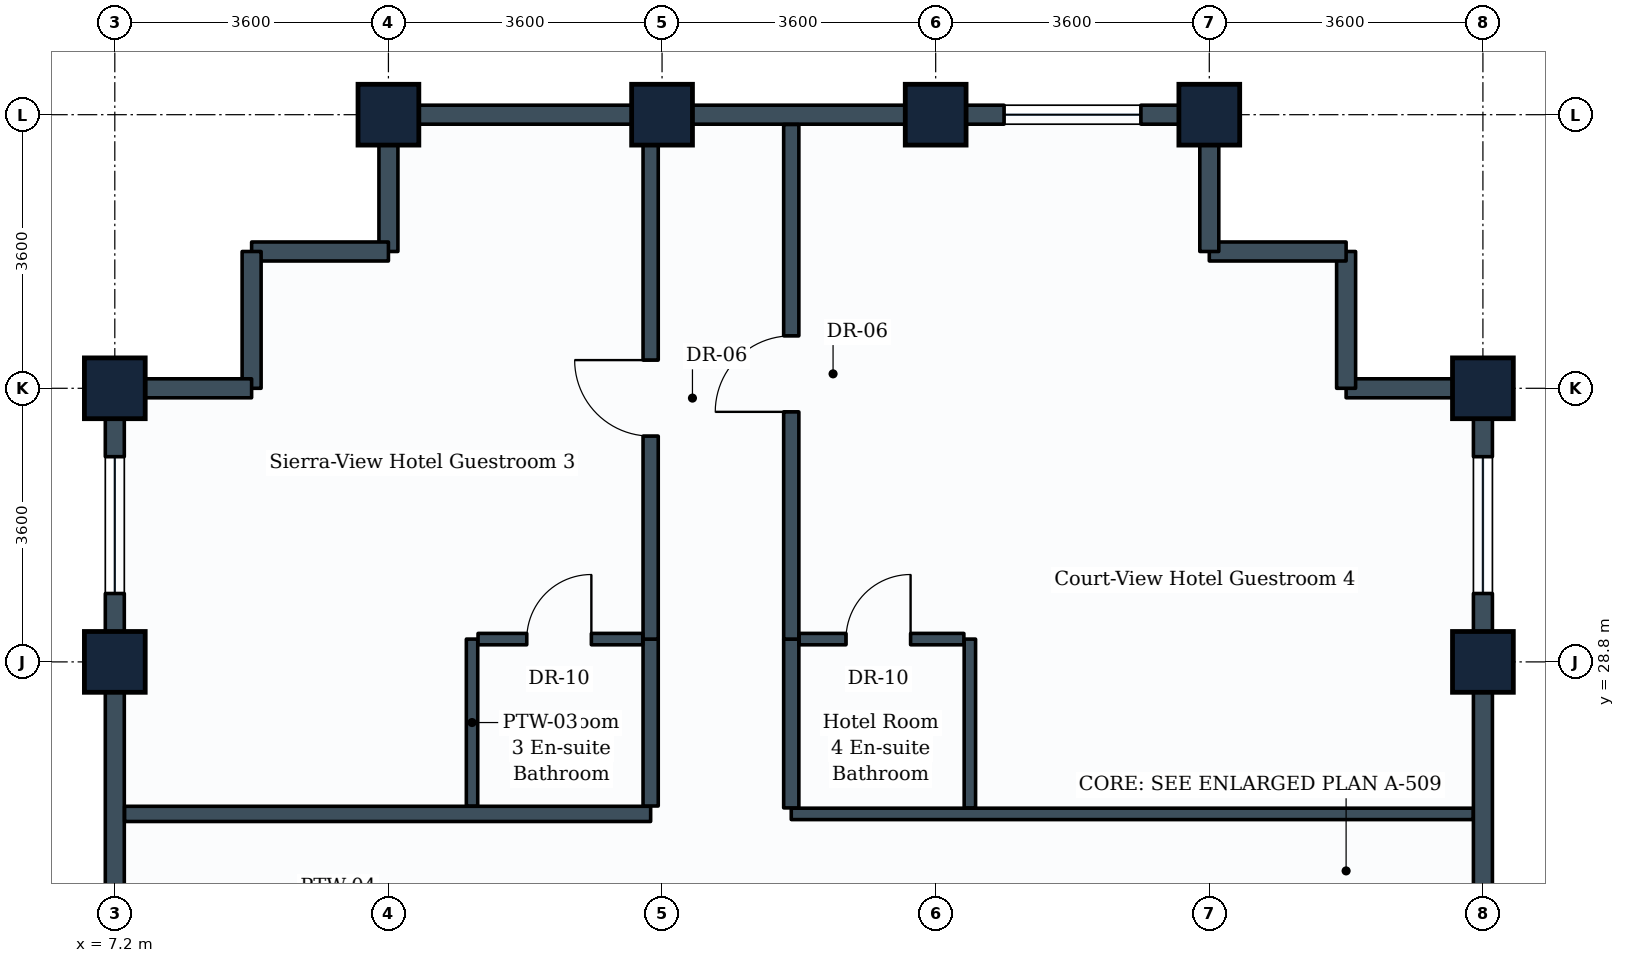
"""IFC4 building model, lengths in metres.
Left out: names, types, materials, properties, quantities, classifications, styles, units other than length and angle.
Written with IfcOpenShell. Run it as: python <this file> out.ifc"""

import sys

from ifc_helpers import new_model, si_unit, direction, frame, frame_2d, origin, origin_2d, place, context, subcontext, project, spatial, rectangle, extrude, element, fill, save


model = new_model("IFC4")
c1 = context("Model", 3, precision=1e-05, world=origin(), true_north=direction((0.0, 1.0)))
c2 = subcontext(c1, "Body", "Model", "MODEL_VIEW")
j1 = project(units=[si_unit("LENGTHUNIT", "METRE"), si_unit("PLANEANGLEUNIT", "RADIAN")], contexts=[c1])
p1 = place(None, origin())
s1 = spatial("IfcSite", under=j1, at=p1, CompositionType="ELEMENT")
p2 = place(p1, origin())
s2 = spatial("IfcBuilding", under=s1, at=p2, CompositionType="ELEMENT")
p3 = place(p2, frame((0.0, 0.0, 281.0)))
s3 = spatial("IfcBuildingStorey", under=s2, at=p3, CompositionType="ELEMENT", Elevation=281.0)
for number, where, z_axis, x_axis in (
    (1, (7.2, 28.8, 0.0), (0.0, 0.0, 1.0), (0.0, 1.0, 0.0)),
    (2, (7.2, 32.4, 0.0), (0.0, 0.0, 1.0), (0.0, 1.0, 0.0)),
    (3, (10.8, 36.0, 0.0), (0.0, 0.0, 1.0), (1.0, 0.0, 0.0)),
    (4, (14.4, 36.0, 0.0), (0.0, 0.0, 1.0), (1.0, 0.0, 0.0)),
    (5, (18.0, 36.0, 0.0), (0.0, 0.0, 1.0), (1.0, 0.0, 0.0)),
    (6, (21.6, 36.0, 0.0), (0.0, 0.0, 1.0), (1.0, 0.0, 0.0)),
    (7, (25.2, 28.8, 0.0), (0.0, 0.0, 1.0), (0.0, 1.0, 0.0)),
    (8, (25.2, 32.4, 0.0), (0.0, 0.0, 1.0), (0.0, 1.0, 0.0)),
):
    element("IfcColumn", number, at=place(p3, frame(where, z_axis=z_axis, x_axis=x_axis)), inside=s3, PredefinedType="COLUMN", context=c2, shape_type="SweptSolid", body=[
        extrude(rectangle(XDim=0.8, YDim=0.8, at=origin_2d()), origin(), (0.0, 0.0, 1.0), 3.6),
    ])
p4 = place(p3, frame((25.2, 28.8, 0.0), z_axis=(0.0, 0.0, 1.0), x_axis=(0.0, -1.0, 0.0)))
e9 = element("IfcWall", 9, at=p4, inside=s3, PredefinedType="STANDARD", context=c2, shape_type="SweptSolid", body=[
    extrude(rectangle(XDim=3.6, YDim=0.25, at=frame_2d((1.8, 0.0))), origin(), (0.0, 0.0, 1.0), 2.83),
])
p5 = place(p3, frame((25.2, 32.4, 0.0), z_axis=(0.0, 0.0, 1.0), x_axis=(0.0, -1.0, 0.0)))
e10 = element("IfcWall", 10, at=p5, inside=s3, PredefinedType="STANDARD", context=c2, shape_type="SweptSolid", body=[
    extrude(rectangle(XDim=3.6, YDim=0.25, at=frame_2d((1.8, 0.0))), origin(), (0.0, 0.0, 1.0), 2.83),
])
p6 = place(p5, frame((0.9, 0.0, 0.85)))
e11 = element("IfcOpeningElement", 11, at=p6, cuts=e10, PredefinedType="OPENING", context=c2, shape_type="SweptSolid", body=[
    extrude(rectangle(XDim=1.8, YDim=1.35, at=frame_2d((0.9, 0.675))), frame((0.0, 0.135, 0.0), z_axis=(0.0, -1.0, 0.0), x_axis=(1.0, 0.0, 0.0)), (0.0, 0.0, 1.0), 0.27),
])
p7 = place(p3, frame((23.4, 32.4, 0.0), z_axis=(0.0, 0.0, 1.0), x_axis=(1.0, 0.0, 0.0)))
e12 = element("IfcWall", 12, at=p7, inside=s3, PredefinedType="STANDARD", context=c2, shape_type="SweptSolid", body=[
    extrude(rectangle(XDim=1.8, YDim=0.25, at=frame_2d((0.9, 0.0))), origin(), (0.0, 0.0, 1.0), 2.83),
])
p8 = place(p3, frame((23.4, 32.4, 0.0), z_axis=(0.0, 0.0, 1.0), x_axis=(0.0, 1.0, 0.0)))
e13 = element("IfcWall", 13, at=p8, inside=s3, PredefinedType="STANDARD", context=c2, shape_type="SweptSolid", body=[
    extrude(rectangle(XDim=1.8, YDim=0.25, at=frame_2d((0.9, 0.0))), origin(), (0.0, 0.0, 1.0), 3.335),
])
p9 = place(p3, frame((21.6, 34.2, 0.0), z_axis=(0.0, 0.0, 1.0), x_axis=(1.0, 0.0, 0.0)))
e14 = element("IfcWall", 14, at=p9, inside=s3, PredefinedType="STANDARD", context=c2, shape_type="SweptSolid", body=[
    extrude(rectangle(XDim=1.8, YDim=0.25, at=frame_2d((0.9, 0.0))), origin(), (0.0, 0.0, 1.0), 3.335),
])
p10 = place(p3, frame((21.6, 34.2, 0.0), z_axis=(0.0, 0.0, 1.0), x_axis=(0.0, 1.0, 0.0)))
e15 = element("IfcWall", 15, at=p10, inside=s3, PredefinedType="STANDARD", context=c2, shape_type="SweptSolid", body=[
    extrude(rectangle(XDim=1.8, YDim=0.25, at=frame_2d((0.9, 0.0))), origin(), (0.0, 0.0, 1.0), 2.83),
])
p11 = place(p3, frame((18.0, 36.0, 0.0), z_axis=(0.0, 0.0, 1.0), x_axis=(1.0, 0.0, 0.0)))
e16 = element("IfcWall", 16, at=p11, inside=s3, PredefinedType="STANDARD", context=c2, shape_type="SweptSolid", body=[
    extrude(rectangle(XDim=3.6, YDim=0.25, at=frame_2d((1.8, 0.0))), origin(), (0.0, 0.0, 1.0), 2.83),
])
p12 = place(p11, frame((0.9, 0.0, 0.85)))
e17 = element("IfcOpeningElement", 17, at=p12, cuts=e16, PredefinedType="OPENING", context=c2, shape_type="SweptSolid", body=[
    extrude(rectangle(XDim=1.8, YDim=1.35, at=frame_2d((0.9, 0.675))), frame((0.0, 0.135, 0.0), z_axis=(0.0, -1.0, 0.0), x_axis=(1.0, 0.0, 0.0)), (0.0, 0.0, 1.0), 0.27),
])
p13 = place(p3, frame((14.4, 36.0, 0.0), z_axis=(0.0, 0.0, 1.0), x_axis=(1.0, 0.0, 0.0)))
e18 = element("IfcWall", 18, at=p13, inside=s3, PredefinedType="STANDARD", context=c2, shape_type="SweptSolid", body=[
    extrude(rectangle(XDim=3.6, YDim=0.25, at=frame_2d((1.8, 0.0))), origin(), (0.0, 0.0, 1.0), 2.83),
])
p14 = place(p3, frame((10.8, 36.0, 0.0), z_axis=(0.0, 0.0, 1.0), x_axis=(1.0, 0.0, 0.0)))
e19 = element("IfcWall", 19, at=p14, inside=s3, PredefinedType="STANDARD", context=c2, shape_type="SweptSolid", body=[
    extrude(rectangle(XDim=3.6, YDim=0.25, at=frame_2d((1.8, 0.0))), origin(), (0.0, 0.0, 1.0), 2.83),
])
p15 = place(p3, frame((10.8, 34.2, 0.0), z_axis=(0.0, 0.0, 1.0), x_axis=(0.0, 1.0, 0.0)))
e20 = element("IfcWall", 20, at=p15, inside=s3, PredefinedType="STANDARD", context=c2, shape_type="SweptSolid", body=[
    extrude(rectangle(XDim=1.8, YDim=0.25, at=frame_2d((0.9, 0.0))), origin(), (0.0, 0.0, 1.0), 2.83),
])
for number, where, z_axis, x_axis in (
    (21, (9.0, 34.2, 0.0), (0.0, 0.0, 1.0), (1.0, 0.0, 0.0)),
    (22, (9.0, 32.4, 0.0), (0.0, 0.0, 1.0), (0.0, 1.0, 0.0)),
):
    element("IfcWall", number, at=place(p3, frame(where, z_axis=z_axis, x_axis=x_axis)), inside=s3, PredefinedType="STANDARD", context=c2, shape_type="SweptSolid", body=[
        extrude(rectangle(XDim=1.8, YDim=0.25, at=frame_2d((0.9, 0.0))), origin(), (0.0, 0.0, 1.0), 3.335),
    ])
p16 = place(p3, frame((7.2, 32.4, 0.0), z_axis=(0.0, 0.0, 1.0), x_axis=(1.0, 0.0, 0.0)))
e23 = element("IfcWall", 23, at=p16, inside=s3, PredefinedType="STANDARD", context=c2, shape_type="SweptSolid", body=[
    extrude(rectangle(XDim=1.8, YDim=0.25, at=frame_2d((0.9, 0.0))), origin(), (0.0, 0.0, 1.0), 2.83),
])
p17 = place(p3, frame((7.2, 28.8, 0.0), z_axis=(0.0, 0.0, 1.0), x_axis=(0.0, 1.0, 0.0)))
e24 = element("IfcWall", 24, at=p17, inside=s3, PredefinedType="STANDARD", context=c2, shape_type="SweptSolid", body=[
    extrude(rectangle(XDim=3.6, YDim=0.25, at=frame_2d((1.8, 0.0))), origin(), (0.0, 0.0, 1.0), 2.83),
])
p18 = place(p17, frame((0.9, 0.0, 0.85)))
e25 = element("IfcOpeningElement", 25, at=p18, cuts=e24, PredefinedType="OPENING", context=c2, shape_type="SweptSolid", body=[
    extrude(rectangle(XDim=1.8, YDim=1.35, at=frame_2d((0.9, 0.675))), frame((0.0, 0.135, 0.0), z_axis=(0.0, -1.0, 0.0), x_axis=(1.0, 0.0, 0.0)), (0.0, 0.0, 1.0), 0.27),
])
p19 = place(p3, frame((7.2, 25.2, 0.0), z_axis=(0.0, 0.0, 1.0), x_axis=(0.0, 1.0, 0.0)))
e26 = element("IfcWall", 26, at=p19, inside=s3, PredefinedType="STANDARD", context=c2, shape_type="SweptSolid", body=[
    extrude(rectangle(XDim=3.6, YDim=0.25, at=frame_2d((1.8, 0.0))), origin(), (0.0, 0.0, 1.0), 2.83),
])
p20 = place(p3, frame((7.329, 26.8, 0.0), z_axis=(0.0, 0.0, 1.0), x_axis=(1.0, 0.0, 0.0)))
e27 = element("IfcWall", 27, at=p20, inside=s3, PredefinedType="PARTITIONING", context=c2, shape_type="SweptSolid", body=[
    extrude(rectangle(XDim=6.921, YDim=0.2, at=frame_2d((3.46, 0.0))), origin(), (0.0, 0.0, 1.0), 2.83),
])
p21 = place(p3, frame((14.25, 26.904, 0.0), z_axis=(0.0, 0.0, 1.0), x_axis=(0.0, 1.0, 0.0)))
e28 = element("IfcWall", 28, at=p21, inside=s3, PredefinedType="PARTITIONING", context=c2, shape_type="SweptSolid", body=[
    extrude(rectangle(XDim=2.196, YDim=0.2, at=frame_2d((1.098, 0.0))), origin(), (0.0, 0.0, 1.0), 3.03),
])
p22 = place(p3, frame((14.25, 29.1, 0.0), z_axis=(0.0, 0.0, 1.0), x_axis=(0.0, 1.0, 0.0)))
e29 = element("IfcWall", 29, at=p22, inside=s3, PredefinedType="PARTITIONING", context=c2, shape_type="SweptSolid", body=[
    extrude(rectangle(XDim=6.771, YDim=0.2, at=frame_2d((3.385, 0.0))), origin(), (0.0, 0.0, 1.0), 2.83),
])
p23 = place(p22, frame((2.671, 0.0, 0.0)))
e30 = element("IfcOpeningElement", 30, at=p23, cuts=e29, PredefinedType="OPENING", context=c2, shape_type="SweptSolid", body=[
    extrude(rectangle(XDim=1.0, YDim=2.1, at=frame_2d((0.5, 1.05))), frame((0.0, 0.11, 0.0), z_axis=(0.0, -1.0, 0.0), x_axis=(1.0, 0.0, 0.0)), (0.0, 0.0, 1.0), 0.22),
])
p24 = place(p3, frame((11.9, 26.904, 0.0), z_axis=(0.0, 0.0, 1.0), x_axis=(0.0, 1.0, 0.0)))
e31 = element("IfcWall", 31, at=p24, inside=s3, PredefinedType="PARTITIONING", context=c2, shape_type="SweptSolid", body=[
    extrude(rectangle(XDim=2.196, YDim=0.15, at=frame_2d((1.098, 0.0))), origin(), (0.0, 0.0, 1.0), 3.03),
])
p25 = place(p3, frame((11.979, 29.1, 0.0), z_axis=(0.0, 0.0, 1.0), x_axis=(1.0, 0.0, 0.0)))
e32 = element("IfcWall", 32, at=p25, inside=s3, PredefinedType="PARTITIONING", context=c2, shape_type="SweptSolid", body=[
    extrude(rectangle(XDim=2.167, YDim=0.15, at=frame_2d((1.083, 0.0))), origin(), (0.0, 0.0, 1.0), 3.335),
])
p26 = place(p25, frame((0.641, 0.0, 0.0)))
e33 = element("IfcOpeningElement", 33, at=p26, cuts=e32, PredefinedType="OPENING", context=c2, shape_type="SweptSolid", body=[
    extrude(rectangle(XDim=0.85, YDim=2.1, at=frame_2d((0.425, 1.05))), frame((0.0, 0.085, 0.0), z_axis=(0.0, -1.0, 0.0), x_axis=(1.0, 0.0, 0.0)), (0.0, 0.0, 1.0), 0.17),
])
p27 = place(p3, frame((16.1, 26.8, 0.0), z_axis=(0.0, 0.0, 1.0), x_axis=(1.0, 0.0, 0.0)))
e34 = element("IfcWall", 34, at=p27, inside=s3, PredefinedType="PARTITIONING", context=c2, shape_type="SweptSolid", body=[
    extrude(rectangle(XDim=8.971, YDim=0.15, at=frame_2d((4.485, 0.0))), origin(), (0.0, 0.0, 1.0), 2.83),
])
p28 = place(p3, frame((16.1, 26.879, 0.0), z_axis=(0.0, 0.0, 1.0), x_axis=(0.0, 1.0, 0.0)))
e35 = element("IfcWall", 35, at=p28, inside=s3, PredefinedType="PARTITIONING", context=c2, shape_type="SweptSolid", body=[
    extrude(rectangle(XDim=2.221, YDim=0.2, at=frame_2d((1.111, 0.0))), origin(), (0.0, 0.0, 1.0), 3.03),
])
p29 = place(p3, frame((16.1, 29.1, 0.0), z_axis=(0.0, 0.0, 1.0), x_axis=(0.0, 1.0, 0.0)))
e36 = element("IfcWall", 36, at=p29, inside=s3, PredefinedType="PARTITIONING", context=c2, shape_type="SweptSolid", body=[
    extrude(rectangle(XDim=6.771, YDim=0.2, at=frame_2d((3.385, 0.0))), origin(), (0.0, 0.0, 1.0), 2.83),
])
p30 = place(p29, frame((2.99, 0.0, 0.0)))
e37 = element("IfcOpeningElement", 37, at=p30, cuts=e36, PredefinedType="OPENING", context=c2, shape_type="SweptSolid", body=[
    extrude(rectangle(XDim=1.0, YDim=2.1, at=frame_2d((0.5, 1.05))), frame((0.0, 0.11, 0.0), z_axis=(0.0, -1.0, 0.0), x_axis=(1.0, 0.0, 0.0)), (0.0, 0.0, 1.0), 0.22),
])
p31 = place(p3, frame((18.45, 26.879, 0.0), z_axis=(0.0, 0.0, 1.0), x_axis=(0.0, 1.0, 0.0)))
e38 = element("IfcWall", 38, at=p31, inside=s3, PredefinedType="PARTITIONING", context=c2, shape_type="SweptSolid", body=[
    extrude(rectangle(XDim=2.221, YDim=0.15, at=frame_2d((1.111, 0.0))), origin(), (0.0, 0.0, 1.0), 3.03),
])
p32 = place(p3, frame((16.204, 29.1, 0.0), z_axis=(0.0, 0.0, 1.0), x_axis=(1.0, 0.0, 0.0)))
e39 = element("IfcWall", 39, at=p32, inside=s3, PredefinedType="PARTITIONING", context=c2, shape_type="SweptSolid", body=[
    extrude(rectangle(XDim=2.167, YDim=0.15, at=frame_2d((1.083, 0.0))), origin(), (0.0, 0.0, 1.0), 3.03),
])
p33 = place(p32, frame((0.616, 0.0, 0.0)))
e40 = element("IfcOpeningElement", 40, at=p33, cuts=e39, PredefinedType="OPENING", context=c2, shape_type="SweptSolid", body=[
    extrude(rectangle(XDim=0.85, YDim=2.1, at=frame_2d((0.425, 1.05))), frame((0.0, 0.085, 0.0), z_axis=(0.0, -1.0, 0.0), x_axis=(1.0, 0.0, 0.0)), (0.0, 0.0, 1.0), 0.17),
])
p34 = place(p6, origin())
e41 = element("IfcWindow", 41, at=p34, inside=s3, PartitioningType="SINGLE_PANEL", PredefinedType="WINDOW", context=c2, shape_type="SweptSolid", body=[
    extrude(rectangle(XDim=1.8, YDim=1.35, at=frame_2d((0.9, 0.675))), frame((0.0, 0.03, 0.0), z_axis=(0.0, -1.0, 0.0), x_axis=(1.0, 0.0, 0.0)), (0.0, 0.0, 1.0), 0.06),
])
fill(e11, e41)
p35 = place(p12, origin())
e42 = element("IfcWindow", 42, at=p35, inside=s3, PartitioningType="SINGLE_PANEL", PredefinedType="WINDOW", context=c2, shape_type="SweptSolid", body=[
    extrude(rectangle(XDim=1.8, YDim=1.35, at=frame_2d((0.9, 0.675))), frame((0.0, 0.03, 0.0), z_axis=(0.0, -1.0, 0.0), x_axis=(1.0, 0.0, 0.0)), (0.0, 0.0, 1.0), 0.06),
])
fill(e17, e42)
p36 = place(p18, origin())
e43 = element("IfcWindow", 43, at=p36, inside=s3, PartitioningType="SINGLE_PANEL", PredefinedType="WINDOW", context=c2, shape_type="SweptSolid", body=[
    extrude(rectangle(XDim=1.8, YDim=1.35, at=frame_2d((0.9, 0.675))), frame((0.0, 0.03, 0.0), z_axis=(0.0, -1.0, 0.0), x_axis=(1.0, 0.0, 0.0)), (0.0, 0.0, 1.0), 0.06),
])
fill(e25, e43)
p37 = place(p23, origin())
e44 = element("IfcDoor", 44, at=p37, inside=s3, OperationType="SINGLE_SWING_RIGHT", PredefinedType="DOOR", context=c2, shape_type="SweptSolid", body=[
    extrude(rectangle(XDim=1.0, YDim=2.1, at=frame_2d((0.5, 1.05))), frame((0.0, 0.025, 0.0), z_axis=(0.0, -1.0, 0.0), x_axis=(1.0, 0.0, 0.0)), (0.0, 0.0, 1.0), 0.05),
])
fill(e30, e44)
p38 = place(p26, origin())
e45 = element("IfcDoor", 45, at=p38, inside=s3, OperationType="SINGLE_SWING_RIGHT", PredefinedType="DOOR", context=c2, shape_type="SweptSolid", body=[
    extrude(rectangle(XDim=0.85, YDim=2.1, at=frame_2d((0.425, 1.05))), frame((0.0, 0.025, 0.0), z_axis=(0.0, -1.0, 0.0), x_axis=(1.0, 0.0, 0.0)), (0.0, 0.0, 1.0), 0.05),
])
fill(e33, e45)
p39 = place(p30, origin())
e46 = element("IfcDoor", 46, at=p39, inside=s3, OperationType="SINGLE_SWING_LEFT", PredefinedType="DOOR", context=c2, shape_type="SweptSolid", body=[
    extrude(rectangle(XDim=1.0, YDim=2.1, at=frame_2d((0.5, 1.05))), frame((0.0, 0.025, 0.0), z_axis=(0.0, -1.0, 0.0), x_axis=(1.0, 0.0, 0.0)), (0.0, 0.0, 1.0), 0.05),
])
fill(e37, e46)
p40 = place(p33, origin())
e47 = element("IfcDoor", 47, at=p40, inside=s3, OperationType="SINGLE_SWING_RIGHT", PredefinedType="DOOR", context=c2, shape_type="SweptSolid", body=[
    extrude(rectangle(XDim=0.85, YDim=2.1, at=frame_2d((0.425, 1.05))), frame((0.0, 0.025, 0.0), z_axis=(0.0, -1.0, 0.0), x_axis=(1.0, 0.0, 0.0)), (0.0, 0.0, 1.0), 0.05),
])
fill(e40, e47)
save(model, sys.argv[1])
